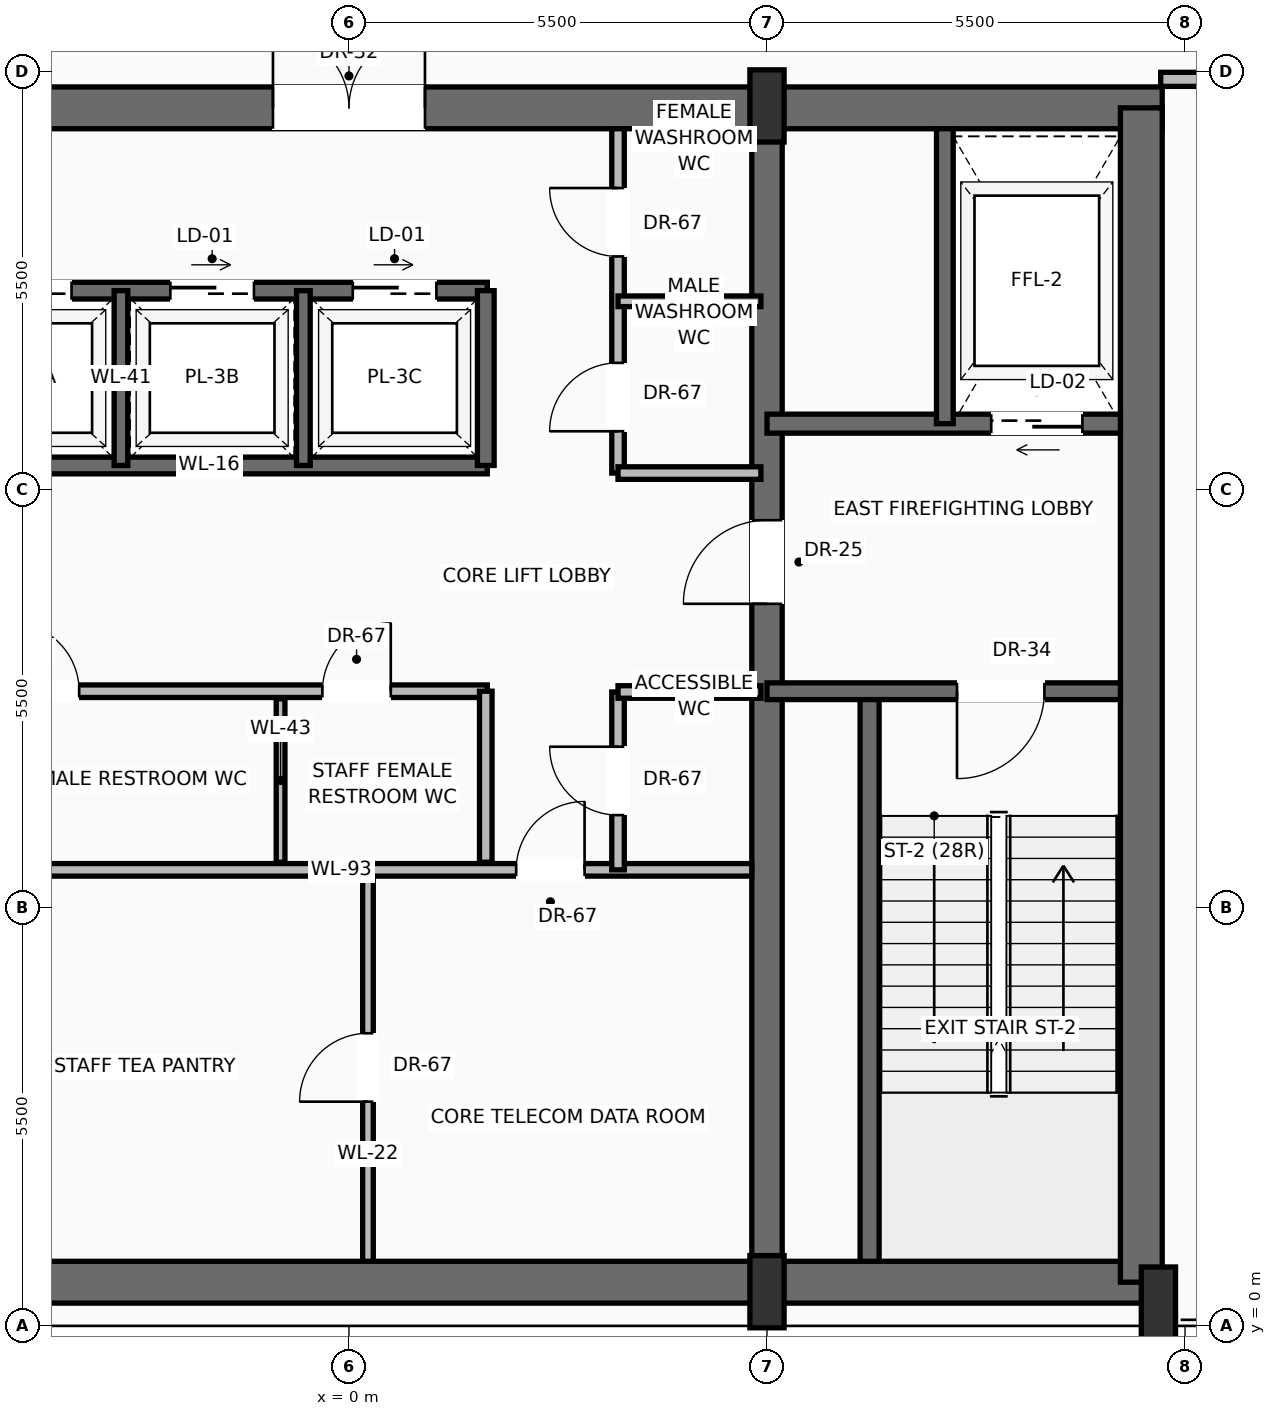
"""IFC4 building model, lengths in metres.
Left out: names, types, materials, properties, quantities, classifications, styles, units other than length and angle.
Written with IfcOpenShell. Run it as: python <this file> out.ifc"""

import sys

from ifc_helpers import new_model, si_unit, direction, frame, frame_2d, origin, origin_2d, place, context, subcontext, project, spatial, rectangle, extrude, source, transform, mapped, element, fill, save


model = new_model("IFC4")
c1 = context("Model", 3, precision=1e-05, world=origin(), true_north=direction((0.0, 1.0)))
c2 = subcontext(c1, "Body", "Model", "MODEL_VIEW")
j1 = project(units=[si_unit("LENGTHUNIT", "METRE"), si_unit("PLANEANGLEUNIT", "RADIAN")], contexts=[c1])
p1 = place(None, origin())
s1 = spatial("IfcSite", under=j1, at=p1, CompositionType="ELEMENT")
p2 = place(p1, origin())
s2 = spatial("IfcBuilding", under=s1, at=p2, CompositionType="ELEMENT")
p3 = place(p2, frame((0.0, 0.0, 257.95)))
s3 = spatial("IfcBuildingStorey", under=s2, at=p3, CompositionType="ELEMENT", Elevation=257.95)
p4 = place(p3, frame((-10.65, 0.575, 0.0), z_axis=(0.0, 0.0, 1.0), x_axis=(1.0, 0.0, 0.0)))
e1 = element("IfcWall", 1, at=p4, inside=s3, PredefinedType="SHEAR", context=c2, shape_type="SweptSolid", body=[
    extrude(rectangle(XDim=21.3, YDim=0.55, at=frame_2d((10.65, 0.0))), origin(), (0.0, 0.0, 1.0), 4.49),
])
p5 = place(p3, frame((-10.7, 16.025, 0.0), z_axis=(0.0, 0.0, 1.0), x_axis=(1.0, 0.0, 0.0)))
e2 = element("IfcWall", 2, at=p5, inside=s3, PredefinedType="SHEAR", context=c2, shape_type="SweptSolid", body=[
    extrude(rectangle(XDim=21.4, YDim=0.55, at=frame_2d((10.7, 0.0))), origin(), (0.0, 0.0, 1.0), 4.49),
])
p6 = place(p5, frame((3.27, 0.0, 0.0)))
e3 = element("IfcOpeningElement", 3, at=p6, cuts=e2, PredefinedType="OPENING", context=c2, shape_type="SweptSolid", body=[
    extrude(rectangle(XDim=1.3, YDim=2.3, at=frame_2d((0.65, 1.15))), frame((0.0, 0.285, 0.0), z_axis=(0.0, -1.0, 0.0), x_axis=(1.0, 0.0, 0.0)), (0.0, 0.0, 1.0), 0.57),
])
p7 = place(p5, frame((9.7, 0.0, 0.0)))
e4 = element("IfcOpeningElement", 4, at=p7, cuts=e2, PredefinedType="OPENING", context=c2, shape_type="SweptSolid", body=[
    extrude(rectangle(XDim=2.0, YDim=2.4, at=frame_2d((1.0, 1.2))), frame((0.0, 0.285, 0.0), z_axis=(0.0, -1.0, 0.0), x_axis=(1.0, 0.0, 0.0)), (0.0, 0.0, 1.0), 0.57),
])
p8 = place(p3, frame((10.425, 0.575, 0.0), z_axis=(0.0, 0.0, 1.0), x_axis=(0.0, 1.0, 0.0)))
e5 = element("IfcWall", 5, at=p8, inside=s3, PredefinedType="SHEAR", context=c2, shape_type="SweptSolid", body=[
    extrude(rectangle(XDim=15.45, YDim=0.55, at=frame_2d((7.725, 0.0))), origin(), (0.0, 0.0, 1.0), 4.49),
])
p9 = place(p3, frame((5.5, 0.575, 0.0), z_axis=(0.0, 0.0, 1.0), x_axis=(0.0, 1.0, 0.0)))
e6 = element("IfcWall", 6, at=p9, inside=s3, PredefinedType="SHEAR", context=c2, shape_type="SweptSolid", body=[
    extrude(rectangle(XDim=15.45, YDim=0.4, at=frame_2d((7.725, 0.0))), origin(), (0.0, 0.0, 1.0), 4.49),
])
p10 = place(p9, frame((8.925, 0.0, 0.0)))
e7 = element("IfcOpeningElement", 7, at=p10, cuts=e6, PredefinedType="OPENING", context=c2, shape_type="SweptSolid", body=[
    extrude(rectangle(XDim=1.1, YDim=2.2, at=frame_2d((0.55, 1.1))), frame((0.0, 0.21, 0.0), z_axis=(0.0, -1.0, 0.0), x_axis=(1.0, 0.0, 0.0)), (0.0, 0.0, 1.0), 0.42),
])
m1 = source(origin(), c2, "Body", "SweptSolid", [
    extrude(rectangle(XDim=0.45, YDim=0.95, at=origin_2d()), origin(), (0.0, 0.0, 1.0), 4.7),
])
for number, where, z_axis, x_axis in (
    (8, (5.5, 0.45, 0.0), (0.0, 0.0, 1.0), (1.0, 0.0, 0.0)),
    (9, (10.65, 0.3, 0.0), (0.0, 0.0, 1.0), (1.0, 0.0, 0.0)),
    (10, (5.5, 16.05, 0.0), (0.0, 0.0, 1.0), (1.0, 0.0, 0.0)),
):
    element("IfcColumn", number, at=place(p3, frame(where, z_axis=z_axis, x_axis=x_axis)), inside=s3, PredefinedType="PILASTER", context=c2, shape_type="MappedRepresentation", body=[
        mapped(m1, transform((0.0, 0.0, 0.0), scale=1.0)),
    ])
p11 = place(p3, frame((6.85, 0.85, 0.0), z_axis=(0.0, 0.0, 1.0), x_axis=(0.0, 1.0, 0.0)))
e11 = element("IfcWall", 11, at=p11, inside=s3, PredefinedType="SOLIDWALL", context=c2, shape_type="SweptSolid", body=[
    extrude(rectangle(XDim=7.5, YDim=0.25, at=frame_2d((3.75, 0.0))), origin(), (0.0, 0.0, 1.0), 4.49),
])
p12 = place(p3, frame((10.15, 8.35, 0.0), z_axis=(0.0, 0.0, 1.0), x_axis=(-1.0, 0.0, 0.0)))
e12 = element("IfcWall", 12, at=p12, inside=s3, PredefinedType="SOLIDWALL", context=c2, shape_type="SweptSolid", body=[
    extrude(rectangle(XDim=4.65, YDim=0.22, at=frame_2d((2.325, 0.0))), origin(), (0.0, 0.0, 1.0), 4.49),
])
p13 = place(p12, frame((1.0, 0.0, 0.0)))
e13 = element("IfcOpeningElement", 13, at=p13, cuts=e12, PredefinedType="OPENING", context=c2, shape_type="SweptSolid", body=[
    extrude(rectangle(XDim=1.15, YDim=2.2, at=frame_2d((0.575, 1.1))), frame((0.0, 0.12, 0.0), z_axis=(0.0, -1.0, 0.0), x_axis=(1.0, 0.0, 0.0)), (0.0, 0.0, 1.0), 0.24),
])
p14 = place(p3, frame((10.15, 11.87, 0.0), z_axis=(0.0, 0.0, 1.0), x_axis=(-1.0, 0.0, 0.0)))
e14 = element("IfcWall", 14, at=p14, inside=s3, PredefinedType="SOLIDWALL", context=c2, shape_type="SweptSolid", body=[
    extrude(rectangle(XDim=4.65, YDim=0.25, at=frame_2d((2.325, 0.0))), origin(), (0.0, 0.0, 1.0), 4.49),
])
p15 = place(p14, frame((0.5, 0.0, 0.0)))
e15 = element("IfcOpeningElement", 15, at=p15, cuts=e14, PredefinedType="OPENING", context=c2, shape_type="SweptSolid", body=[
    extrude(rectangle(XDim=1.2, YDim=2.25, at=frame_2d((0.6, 1.125))), frame((0.0, 0.135, 0.0), z_axis=(0.0, -1.0, 0.0), x_axis=(1.0, 0.0, 0.0)), (0.0, 0.0, 1.0), 0.27),
])
p16 = place(p3, frame((7.84, 11.87, 0.0), z_axis=(0.0, 0.0, 1.0), x_axis=(0.0, 1.0, 0.0)))
e16 = element("IfcWall", 16, at=p16, inside=s3, PredefinedType="SOLIDWALL", context=c2, shape_type="SweptSolid", body=[
    extrude(rectangle(XDim=3.88, YDim=0.22, at=frame_2d((1.94, 0.0))), origin(), (0.0, 0.0, 1.0), 4.49),
])
p17 = place(p3, frame((-5.5, 6.0, 0.0), z_axis=(0.0, 0.0, 1.0), x_axis=(1.0, 0.0, 0.0)))
e17 = element("IfcWall", 17, at=p17, inside=s3, PredefinedType="PARTITIONING", context=c2, shape_type="SweptSolid", body=[
    extrude(rectangle(XDim=10.8, YDim=0.165, at=frame_2d((5.4, 0.0))), origin(), (0.0, 0.0, 1.0), 4.482),
])
p18 = place(p17, frame((7.7, 0.0, 0.0)))
e18 = element("IfcOpeningElement", 18, at=p18, cuts=e17, PredefinedType="OPENING", context=c2, shape_type="SweptSolid", body=[
    extrude(rectangle(XDim=0.9, YDim=2.1, at=frame_2d((0.45, 1.05))), frame((0.0, 0.093, 0.0), z_axis=(0.0, -1.0, 0.0), x_axis=(1.0, 0.0, 0.0)), (0.0, 0.0, 1.0), 0.185),
])
p19 = place(p3, frame((0.25, 0.85, 0.0), z_axis=(0.0, 0.0, 1.0), x_axis=(0.0, 1.0, 0.0)))
e19 = element("IfcWall", 19, at=p19, inside=s3, PredefinedType="PARTITIONING", context=c2, shape_type="SweptSolid", body=[
    extrude(rectangle(XDim=5.03, YDim=0.14, at=frame_2d((2.515, 0.0))), origin(), (0.0, 0.0, 1.0), 4.482),
])
p20 = place(p19, frame((2.1, 0.0, 0.0)))
e20 = element("IfcOpeningElement", 20, at=p20, cuts=e19, PredefinedType="OPENING", context=c2, shape_type="SweptSolid", body=[
    extrude(rectangle(XDim=0.9, YDim=2.1, at=frame_2d((0.45, 1.05))), frame((0.0, 0.08, 0.0), z_axis=(0.0, -1.0, 0.0), x_axis=(1.0, 0.0, 0.0)), (0.0, 0.0, 1.0), 0.16),
])
p21 = place(p3, frame((3.54, 6.0, 0.0), z_axis=(0.0, 0.0, 1.0), x_axis=(0.0, 1.0, 0.0)))
e21 = element("IfcWall", 21, at=p21, inside=s3, PredefinedType="PARTITIONING", context=c2, shape_type="SweptSolid", body=[
    extrude(rectangle(XDim=2.34, YDim=0.165, at=frame_2d((1.17, 0.0))), origin(), (0.0, 0.0, 1.0), 4.482),
])
p22 = place(p21, frame((0.72, 0.0, 0.0)))
e22 = element("IfcOpeningElement", 22, at=p22, cuts=e21, PredefinedType="OPENING", context=c2, shape_type="SweptSolid", body=[
    extrude(rectangle(XDim=0.9, YDim=2.1, at=frame_2d((0.45, 1.05))), frame((0.0, 0.093, 0.0), z_axis=(0.0, -1.0, 0.0), x_axis=(1.0, 0.0, 0.0)), (0.0, 0.0, 1.0), 0.185),
])
p23 = place(p3, frame((3.54, 8.34, 0.0), z_axis=(0.0, 0.0, 1.0), x_axis=(1.0, 0.0, 0.0)))
e23 = element("IfcWall", 23, at=p23, inside=s3, PredefinedType="PARTITIONING", context=c2, shape_type="SweptSolid", body=[
    extrude(rectangle(XDim=1.88, YDim=0.165, at=frame_2d((0.94, 0.0))), origin(), (0.0, 0.0, 1.0), 4.482),
])
p24 = place(p3, frame((-5.3, 8.35, 0.0), z_axis=(0.0, 0.0, 1.0), x_axis=(1.0, 0.0, 0.0)))
e24 = element("IfcWall", 24, at=p24, inside=s3, PredefinedType="PARTITIONING", context=c2, shape_type="SweptSolid", body=[
    extrude(rectangle(XDim=7.12, YDim=0.165, at=frame_2d((3.56, 0.0))), origin(), (0.0, 0.0, 1.0), 4.482),
])
p25 = place(p24, frame((0.85, 0.0, 0.0)))
e25 = element("IfcOpeningElement", 25, at=p25, cuts=e24, PredefinedType="OPENING", context=c2, shape_type="SweptSolid", body=[
    extrude(rectangle(XDim=0.9, YDim=2.1, at=frame_2d((0.45, 1.05))), frame((0.0, 0.093, 0.0), z_axis=(0.0, -1.0, 0.0), x_axis=(1.0, 0.0, 0.0)), (0.0, 0.0, 1.0), 0.185),
])
p26 = place(p24, frame((4.95, 0.0, 0.0)))
e26 = element("IfcOpeningElement", 26, at=p26, cuts=e24, PredefinedType="OPENING", context=c2, shape_type="SweptSolid", body=[
    extrude(rectangle(XDim=0.9, YDim=2.1, at=frame_2d((0.45, 1.05))), frame((0.0, 0.093, 0.0), z_axis=(0.0, -1.0, 0.0), x_axis=(1.0, 0.0, 0.0)), (0.0, 0.0, 1.0), 0.185),
])
p27 = place(p3, frame((1.8, 6.1, 0.0), z_axis=(0.0, 0.0, 1.0), x_axis=(0.0, 1.0, 0.0)))
e27 = element("IfcWall", 27, at=p27, inside=s3, PredefinedType="PARTITIONING", context=c2, shape_type="SweptSolid", body=[
    extrude(rectangle(XDim=2.25, YDim=0.165, at=frame_2d((1.125, 0.0))), origin(), (0.0, 0.0, 1.0), 4.482),
])
p28 = place(p3, frame((-0.9, 6.1, 0.0), z_axis=(0.0, 0.0, 1.0), x_axis=(0.0, 1.0, 0.0)))
e28 = element("IfcWall", 28, at=p28, inside=s3, PredefinedType="PARTITIONING", context=c2, shape_type="SweptSolid", body=[
    extrude(rectangle(XDim=2.15, YDim=0.115, at=frame_2d((1.075, 0.0))), origin(), (0.0, 0.0, 1.0), 4.482),
])
p29 = place(p3, frame((-5.5, 11.32, 0.0), z_axis=(0.0, 0.0, 1.0), x_axis=(1.0, 0.0, 0.0)))
e29 = element("IfcWall", 29, at=p29, inside=s3, PredefinedType="SOLIDWALL", context=c2, shape_type="SweptSolid", body=[
    extrude(rectangle(XDim=7.32, YDim=0.22, at=frame_2d((3.66, 0.0))), origin(), (0.0, 0.0, 1.0), 4.49),
])
p30 = place(p3, frame((-5.5, 13.62, 0.0), z_axis=(0.0, 0.0, 1.0), x_axis=(1.0, 0.0, 0.0)))
e30 = element("IfcWall", 30, at=p30, inside=s3, PredefinedType="SOLIDWALL", context=c2, shape_type="SweptSolid", body=[
    extrude(rectangle(XDim=7.32, YDim=0.22, at=frame_2d((3.66, 0.0))), origin(), (0.0, 0.0, 1.0), 4.49),
])
p31 = place(p30, frame((0.75, 0.0, 0.0)))
e31 = element("IfcOpeningElement", 31, at=p31, cuts=e30, PredefinedType="OPENING", context=c2, shape_type="SweptSolid", body=[
    extrude(rectangle(XDim=1.1, YDim=2.2, at=frame_2d((0.55, 1.1))), frame((0.0, 0.12, 0.0), z_axis=(0.0, -1.0, 0.0), x_axis=(1.0, 0.0, 0.0)), (0.0, 0.0, 1.0), 0.24),
])
p32 = place(p30, frame((3.15, 0.0, 0.0)))
e32 = element("IfcOpeningElement", 32, at=p32, cuts=e30, PredefinedType="OPENING", context=c2, shape_type="SweptSolid", body=[
    extrude(rectangle(XDim=1.1, YDim=2.2, at=frame_2d((0.55, 1.1))), frame((0.0, 0.12, 0.0), z_axis=(0.0, -1.0, 0.0), x_axis=(1.0, 0.0, 0.0)), (0.0, 0.0, 1.0), 0.24),
])
p33 = place(p30, frame((5.55, 0.0, 0.0)))
e33 = element("IfcOpeningElement", 33, at=p33, cuts=e30, PredefinedType="OPENING", context=c2, shape_type="SweptSolid", body=[
    extrude(rectangle(XDim=1.1, YDim=2.2, at=frame_2d((0.55, 1.1))), frame((0.0, 0.12, 0.0), z_axis=(0.0, -1.0, 0.0), x_axis=(1.0, 0.0, 0.0)), (0.0, 0.0, 1.0), 0.24),
])
p34 = place(p3, frame((1.8, 11.32, 0.0), z_axis=(0.0, 0.0, 1.0), x_axis=(0.0, 1.0, 0.0)))
e34 = element("IfcWall", 34, at=p34, inside=s3, PredefinedType="SOLIDWALL", context=c2, shape_type="SweptSolid", body=[
    extrude(rectangle(XDim=2.3, YDim=0.22, at=frame_2d((1.15, 0.0))), origin(), (0.0, 0.0, 1.0), 4.49),
])
for number, where, z_axis, x_axis in (
    (35, (-3.0, 11.32, 0.0), (0.0, 0.0, 1.0), (0.0, 1.0, 0.0)),
    (36, (-0.6, 11.32, 0.0), (0.0, 0.0, 1.0), (0.0, 1.0, 0.0)),
):
    element("IfcWall", number, at=place(p3, frame(where, z_axis=z_axis, x_axis=x_axis)), inside=s3, PredefinedType="SOLIDWALL", context=c2, shape_type="SweptSolid", body=[
        extrude(rectangle(XDim=2.3, YDim=0.18, at=frame_2d((1.15, 0.0))), origin(), (0.0, 0.0, 1.0), 4.49),
    ])
p35 = place(p3, frame((3.54, 11.22, 0.0), z_axis=(0.0, 0.0, 1.0), x_axis=(0.0, 1.0, 0.0)))
e37 = element("IfcWall", 37, at=p35, inside=s3, PredefinedType="PARTITIONING", context=c2, shape_type="SweptSolid", body=[
    extrude(rectangle(XDim=4.53, YDim=0.165, at=frame_2d((2.265, 0.0))), origin(), (0.0, 0.0, 1.0), 4.482),
])
p36 = place(p35, frame((0.55, 0.0, 0.0)))
e38 = element("IfcOpeningElement", 38, at=p36, cuts=e37, PredefinedType="OPENING", context=c2, shape_type="SweptSolid", body=[
    extrude(rectangle(XDim=0.9, YDim=2.1, at=frame_2d((0.45, 1.05))), frame((0.0, 0.093, 0.0), z_axis=(0.0, -1.0, 0.0), x_axis=(1.0, 0.0, 0.0)), (0.0, 0.0, 1.0), 0.185),
])
p37 = place(p35, frame((2.85, 0.0, 0.0)))
e39 = element("IfcOpeningElement", 39, at=p37, cuts=e37, PredefinedType="OPENING", context=c2, shape_type="SweptSolid", body=[
    extrude(rectangle(XDim=0.9, YDim=2.1, at=frame_2d((0.45, 1.05))), frame((0.0, 0.093, 0.0), z_axis=(0.0, -1.0, 0.0), x_axis=(1.0, 0.0, 0.0)), (0.0, 0.0, 1.0), 0.185),
])
p38 = place(p3, frame((3.54, 11.22, 0.0), z_axis=(0.0, 0.0, 1.0), x_axis=(1.0, 0.0, 0.0)))
e40 = element("IfcWall", 40, at=p38, inside=s3, PredefinedType="PARTITIONING", context=c2, shape_type="SweptSolid", body=[
    extrude(rectangle(XDim=1.88, YDim=0.165, at=frame_2d((0.94, 0.0))), origin(), (0.0, 0.0, 1.0), 4.482),
])
p39 = place(p3, frame((3.54, 13.48, 0.0), z_axis=(0.0, 0.0, 1.0), x_axis=(1.0, 0.0, 0.0)))
e41 = element("IfcWall", 41, at=p39, inside=s3, PredefinedType="PARTITIONING", context=c2, shape_type="SweptSolid", body=[
    extrude(rectangle(XDim=1.88, YDim=0.14, at=frame_2d((0.94, 0.0))), origin(), (0.0, 0.0, 1.0), 4.482),
])
p40 = place(p3, frame((10.68, 16.4, 0.0), z_axis=(0.0, 0.0, 1.0), x_axis=(1.0, 0.0, 0.0)))
e42 = element("IfcWall", 42, at=p40, inside=s3, PredefinedType="PARTITIONING", context=c2, shape_type="SweptSolid", body=[
    extrude(rectangle(XDim=6.997, YDim=0.185, at=frame_2d((3.499, 0.0))), origin(), (0.0, 0.0, 1.0), 4.482),
])
p41 = place(p40, frame((2.749, 0.0, 0.0)))
e43 = element("IfcOpeningElement", 43, at=p41, cuts=e42, PredefinedType="OPENING", context=c2, shape_type="SweptSolid", body=[
    extrude(rectangle(XDim=1.5, YDim=2.25, at=frame_2d((0.75, 1.125))), frame((0.0, 0.103, 0.0), z_axis=(0.0, -1.0, 0.0), x_axis=(1.0, 0.0, 0.0)), (0.0, 0.0, 1.0), 0.205),
])
m2 = source(origin(), c2, "Body", "SweptSolid", [
    extrude(rectangle(XDim=1.15, YDim=2.2, at=frame_2d((0.575, 1.1))), frame((0.0, 0.025, 0.0), z_axis=(0.0, -1.0, 0.0), x_axis=(1.0, 0.0, 0.0)), (0.0, 0.0, 1.0), 0.05),
])
p42 = place(p13, origin())
e44 = element("IfcDoor", 44, at=p42, inside=s3, OperationType="SINGLE_SWING_RIGHT", PredefinedType="DOOR", context=c2, shape_type="MappedRepresentation", body=[
    mapped(m2, transform((0.0, 0.0, 0.0), scale=1.0)),
])
fill(e13, e44)
m3 = source(origin(), c2, "Body", "SweptSolid", [
    extrude(rectangle(XDim=1.1, YDim=2.2, at=frame_2d((0.55, 1.1))), frame((0.0, 0.025, 0.0), z_axis=(0.0, -1.0, 0.0), x_axis=(1.0, 0.0, 0.0)), (0.0, 0.0, 1.0), 0.05),
])
p43 = place(p10, origin())
e45 = element("IfcDoor", 45, at=p43, inside=s3, OperationType="SINGLE_SWING_LEFT", PredefinedType="DOOR", context=c2, shape_type="MappedRepresentation", body=[
    mapped(m3, transform((0.0, 0.0, 0.0), scale=1.0)),
])
fill(e7, e45)
m4 = source(origin(), c2, "Body", "SweptSolid", [
    extrude(rectangle(XDim=1.2, YDim=2.25, at=frame_2d((0.6, 1.125))), frame((0.0, 0.025, 0.0), z_axis=(0.0, -1.0, 0.0), x_axis=(1.0, 0.0, 0.0)), (0.0, 0.0, 1.0), 0.05),
])
p44 = place(p15, origin())
e46 = element("IfcDoor", 46, at=p44, inside=s3, OperationType="SLIDING_TO_RIGHT", PredefinedType="DOOR", context=c2, shape_type="MappedRepresentation", body=[
    mapped(m4, transform((0.0, 0.0, 0.0), scale=1.0)),
])
fill(e15, e46)
m5 = source(origin(), c2, "Body", "SweptSolid", [
    extrude(rectangle(XDim=2.0, YDim=2.4, at=frame_2d((1.0, 1.2))), frame((0.0, 0.025, 0.0), z_axis=(0.0, -1.0, 0.0), x_axis=(1.0, 0.0, 0.0)), (0.0, 0.0, 1.0), 0.05),
])
p45 = place(p7, origin())
e47 = element("IfcDoor", 47, at=p45, inside=s3, OperationType="DOUBLE_DOOR_SINGLE_SWING", PredefinedType="DOOR", context=c2, shape_type="MappedRepresentation", body=[
    mapped(m5, transform((0.0, 0.0, 0.0), scale=1.0)),
])
fill(e4, e47)
m6 = source(origin(), c2, "Body", "SweptSolid", [
    extrude(rectangle(XDim=0.9, YDim=2.1, at=frame_2d((0.45, 1.05))), frame((0.0, 0.025, 0.0), z_axis=(0.0, -1.0, 0.0), x_axis=(1.0, 0.0, 0.0)), (0.0, 0.0, 1.0), 0.05),
])
p46 = place(p18, origin())
e48 = element("IfcDoor", 48, at=p46, inside=s3, OperationType="SINGLE_SWING_RIGHT", PredefinedType="DOOR", context=c2, shape_type="MappedRepresentation", body=[
    mapped(m6, transform((0.0, 0.0, 0.0), scale=1.0)),
])
fill(e18, e48)
p47 = place(p20, origin())
e49 = element("IfcDoor", 49, at=p47, inside=s3, OperationType="SINGLE_SWING_LEFT", PredefinedType="DOOR", context=c2, shape_type="MappedRepresentation", body=[
    mapped(m6, transform((0.0, 0.0, 0.0), scale=1.0)),
])
fill(e20, e49)
p48 = place(p22, origin())
e50 = element("IfcDoor", 50, at=p48, inside=s3, OperationType="SINGLE_SWING_RIGHT", PredefinedType="DOOR", context=c2, shape_type="MappedRepresentation", body=[
    mapped(m6, transform((0.0, 0.0, 0.0), scale=1.0)),
])
fill(e22, e50)
p49 = place(p25, origin())
e51 = element("IfcDoor", 51, at=p49, inside=s3, OperationType="SINGLE_SWING_LEFT", PredefinedType="DOOR", context=c2, shape_type="MappedRepresentation", body=[
    mapped(m6, transform((0.0, 0.0, 0.0), scale=1.0)),
])
fill(e25, e51)
p50 = place(p26, origin())
e52 = element("IfcDoor", 52, at=p50, inside=s3, OperationType="SINGLE_SWING_RIGHT", PredefinedType="DOOR", context=c2, shape_type="MappedRepresentation", body=[
    mapped(m6, transform((0.0, 0.0, 0.0), scale=1.0)),
])
fill(e26, e52)
m7 = source(origin(), c2, "Body", "SweptSolid", [
    extrude(rectangle(XDim=1.1, YDim=2.2, at=frame_2d((0.55, 1.1))), frame((0.0, 0.025, 0.0), z_axis=(0.0, -1.0, 0.0), x_axis=(1.0, 0.0, 0.0)), (0.0, 0.0, 1.0), 0.05),
])
p51 = place(p31, origin())
e53 = element("IfcDoor", 53, at=p51, inside=s3, OperationType="SLIDING_TO_RIGHT", PredefinedType="DOOR", context=c2, shape_type="MappedRepresentation", body=[
    mapped(m7, transform((0.0, 0.0, 0.0), scale=1.0)),
])
fill(e31, e53)
p52 = place(p32, origin())
e54 = element("IfcDoor", 54, at=p52, inside=s3, OperationType="SLIDING_TO_RIGHT", PredefinedType="DOOR", context=c2, shape_type="MappedRepresentation", body=[
    mapped(m7, transform((0.0, 0.0, 0.0), scale=1.0)),
])
fill(e32, e54)
p53 = place(p33, origin())
e55 = element("IfcDoor", 55, at=p53, inside=s3, OperationType="SLIDING_TO_RIGHT", PredefinedType="DOOR", context=c2, shape_type="MappedRepresentation", body=[
    mapped(m7, transform((0.0, 0.0, 0.0), scale=1.0)),
])
fill(e33, e55)
p54 = place(p36, origin())
e56 = element("IfcDoor", 56, at=p54, inside=s3, OperationType="SINGLE_SWING_LEFT", PredefinedType="DOOR", context=c2, shape_type="MappedRepresentation", body=[
    mapped(m6, transform((0.0, 0.0, 0.0), scale=1.0)),
])
fill(e38, e56)
p55 = place(p37, origin())
e57 = element("IfcDoor", 57, at=p55, inside=s3, OperationType="SINGLE_SWING_RIGHT", PredefinedType="DOOR", context=c2, shape_type="MappedRepresentation", body=[
    mapped(m6, transform((0.0, 0.0, 0.0), scale=1.0)),
])
fill(e39, e57)
save(model, sys.argv[1])
